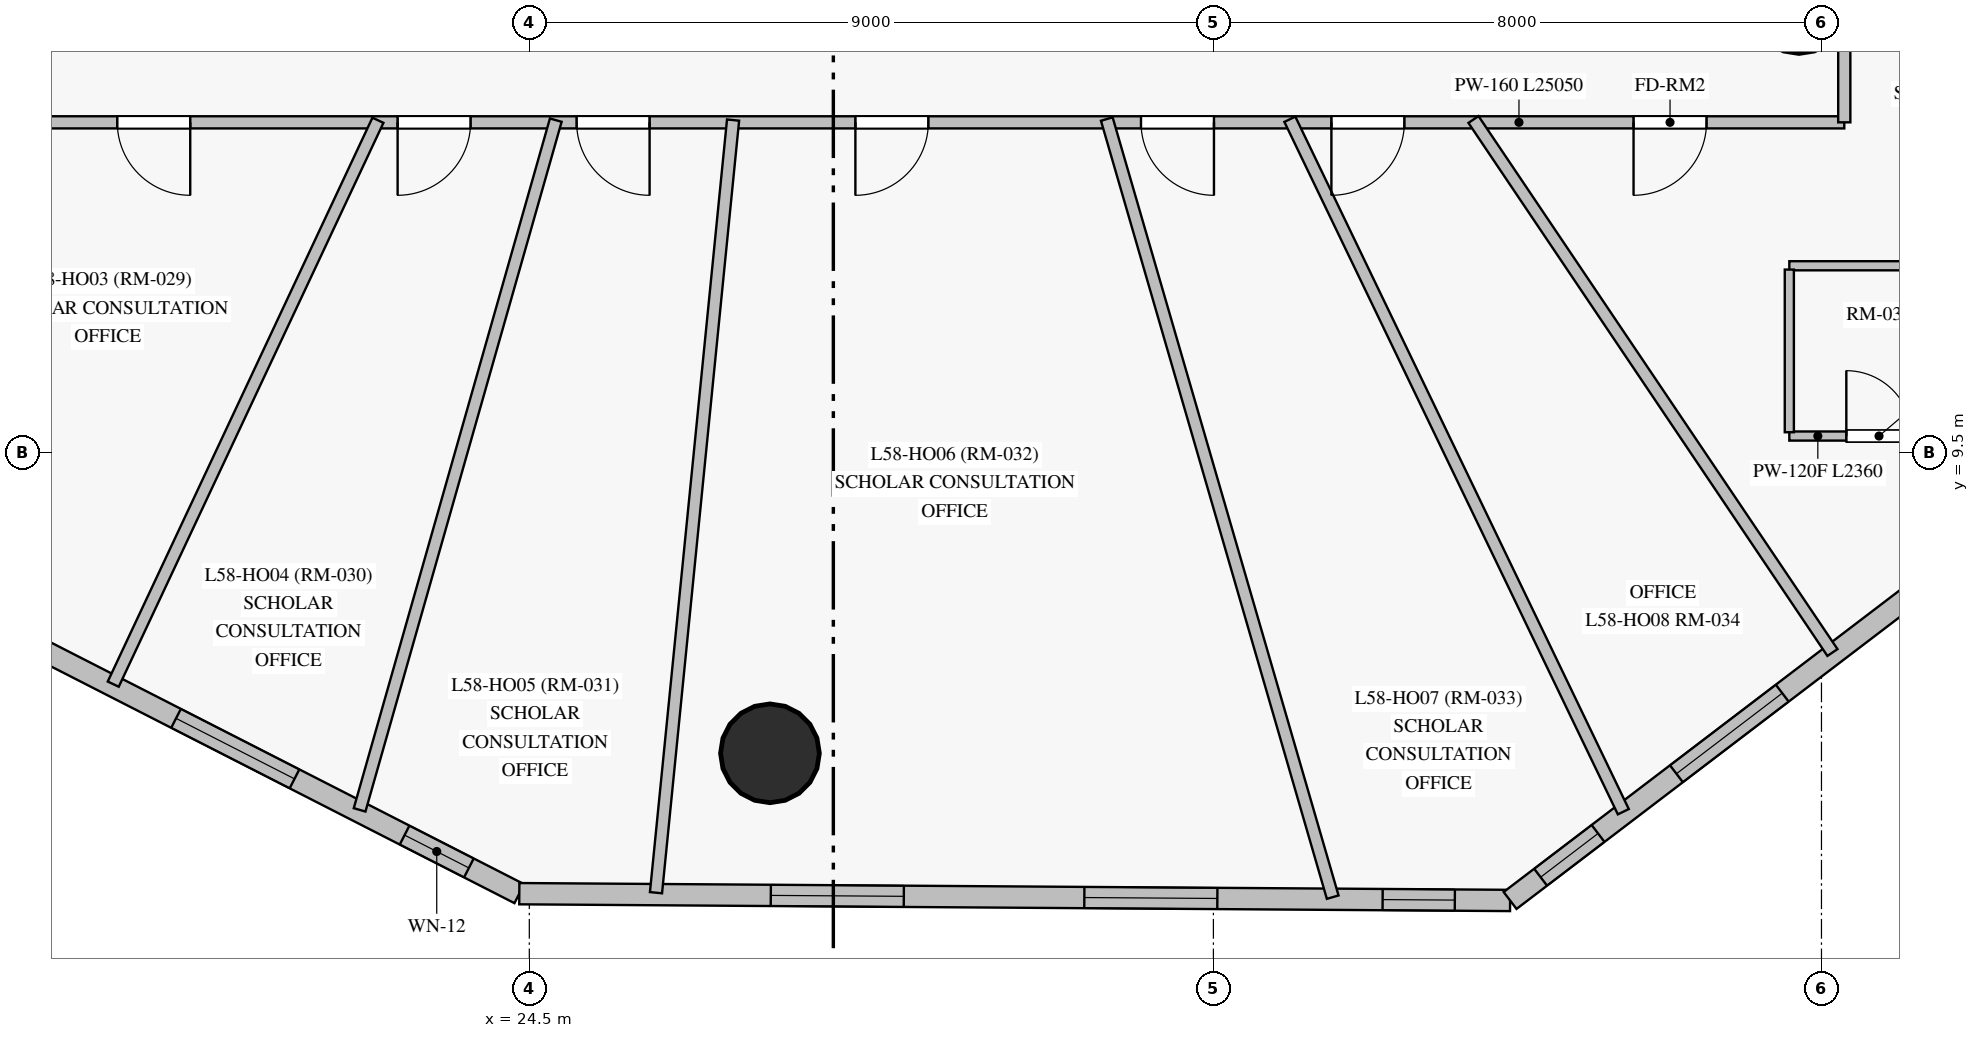
"""IFC4 building model, lengths in metres.
Left out: names, types, materials, properties, quantities, classifications, styles, units other than length and angle.
Written with IfcOpenShell. Run it as: python <this file> out.ifc"""

import sys

from ifc_helpers import new_model, si_unit, direction, frame, frame_2d, origin, origin_with_axes, origin_2d, place, context, subcontext, project, spatial, rectangle, circle, extrude, source, transform, mapped, element, fill, save


model = new_model("IFC4")
c1 = context("Model", 3, precision=1e-05, world=origin(), true_north=direction((0.0, 1.0)))
c2 = subcontext(c1, "Body", "Model", "MODEL_VIEW")
j1 = project(units=[si_unit("LENGTHUNIT", "METRE"), si_unit("PLANEANGLEUNIT", "RADIAN")], contexts=[c1])
p1 = place(None, origin())
s1 = spatial("IfcSite", under=j1, at=p1, CompositionType="ELEMENT")
p2 = place(p1, origin())
s2 = spatial("IfcBuilding", under=s1, at=p2, CompositionType="ELEMENT")
p3 = place(p2, frame((0.0, 0.0, 199.25)))
s3 = spatial("IfcBuildingStorey", under=s2, at=p3, CompositionType="ELEMENT", Elevation=199.25)
m1 = source(origin_with_axes(), c2, "Body", "SweptSolid", [
    extrude(circle(Radius=0.65, at=origin_2d()), origin(), (0.0, 0.0, 1.0), 3.05),
])
for number, where, z_axis, x_axis in (
    (1, (27.666, 5.549, 0.0), (0.0, 0.0, 1.0), (1.0, 0.0, 0.0)),
    (2, (41.204, 15.406, 0.0), (0.0, 0.0, 1.0), (1.0, 0.0, 0.0)),
):
    element("IfcColumn", number, at=place(p3, frame(where, z_axis=z_axis, x_axis=x_axis)), inside=s3, PredefinedType="COLUMN", context=c2, shape_type="MappedRepresentation", body=[
        mapped(m1, transform((0.0, 0.0, 0.0), scale=1.0)),
    ])
p4 = place(p3, frame((15.396, 8.285, 0.0), z_axis=(0.0, 0.0, 1.0), x_axis=(0.890555767274, -0.454874076394, 0.0)))
e3 = element("IfcWall", 3, at=p4, inside=s3, PredefinedType="SOLIDWALL", context=c2, shape_type="SweptSolid", body=[
    extrude(rectangle(XDim=10.075, YDim=0.28, at=frame_2d((5.037, 0.0))), origin(), (0.0, 0.0, 1.0), 2.825),
])
p5 = place(p4, frame((1.186, 0.0, 0.85)))
e4 = element("IfcOpeningElement", 4, at=p5, cuts=e3, PredefinedType="OPENING", context=c2, shape_type="SweptSolid", body=[
    extrude(rectangle(XDim=1.75, YDim=1.65, at=frame_2d((0.875, 0.825))), frame((0.0, 0.15, 0.0), z_axis=(0.0, -1.0, 0.0), x_axis=(1.0, 0.0, 0.0)), (0.0, 0.0, 1.0), 0.3),
])
p6 = place(p4, frame((5.004, 0.0, 0.85)))
e5 = element("IfcOpeningElement", 5, at=p6, cuts=e3, PredefinedType="OPENING", context=c2, shape_type="SweptSolid", body=[
    extrude(rectangle(XDim=1.75, YDim=1.65, at=frame_2d((0.875, 0.825))), frame((0.0, 0.15, 0.0), z_axis=(0.0, -1.0, 0.0), x_axis=(1.0, 0.0, 0.0)), (0.0, 0.0, 1.0), 0.3),
])
p7 = place(p4, frame((8.38, 0.0, 0.85)))
e6 = element("IfcOpeningElement", 6, at=p7, cuts=e3, PredefinedType="OPENING", context=c2, shape_type="SweptSolid", body=[
    extrude(rectangle(XDim=0.95, YDim=1.5, at=frame_2d((0.475, 0.75))), frame((0.0, 0.15, 0.0), z_axis=(0.0, -1.0, 0.0), x_axis=(1.0, 0.0, 0.0)), (0.0, 0.0, 1.0), 0.3),
])
p8 = place(p3, frame((24.368, 3.702, 0.0), z_axis=(0.0, 0.0, 1.0), x_axis=(0.999976504713, -0.006854926874, 0.0)))
e7 = element("IfcWall", 7, at=p8, inside=s3, PredefinedType="SOLIDWALL", context=c2, shape_type="SweptSolid", body=[
    extrude(rectangle(XDim=13.035, YDim=0.28, at=frame_2d((6.518, 0.0))), origin(), (0.0, 0.0, 1.0), 2.825),
])
p9 = place(p8, frame((3.309, 0.0, 0.85)))
e8 = element("IfcOpeningElement", 8, at=p9, cuts=e7, PredefinedType="OPENING", context=c2, shape_type="SweptSolid", body=[
    extrude(rectangle(XDim=1.75, YDim=1.65, at=frame_2d((0.875, 0.825))), frame((0.0, 0.15, 0.0), z_axis=(0.0, -1.0, 0.0), x_axis=(1.0, 0.0, 0.0)), (0.0, 0.0, 1.0), 0.3),
])
p10 = place(p8, frame((7.434, 0.0, 0.85)))
e9 = element("IfcOpeningElement", 9, at=p10, cuts=e7, PredefinedType="OPENING", context=c2, shape_type="SweptSolid", body=[
    extrude(rectangle(XDim=1.75, YDim=1.65, at=frame_2d((0.875, 0.825))), frame((0.0, 0.15, 0.0), z_axis=(0.0, -1.0, 0.0), x_axis=(1.0, 0.0, 0.0)), (0.0, 0.0, 1.0), 0.3),
])
p11 = place(p8, frame((11.358, 0.0, 0.85)))
e10 = element("IfcOpeningElement", 10, at=p11, cuts=e7, PredefinedType="OPENING", context=c2, shape_type="SweptSolid", body=[
    extrude(rectangle(XDim=0.95, YDim=1.5, at=frame_2d((0.475, 0.75))), frame((0.0, 0.15, 0.0), z_axis=(0.0, -1.0, 0.0), x_axis=(1.0, 0.0, 0.0)), (0.0, 0.0, 1.0), 0.3),
])
p12 = place(p3, frame((37.403, 3.613, 0.0), z_axis=(0.0, 0.0, 1.0), x_axis=(0.795510317951, 0.605940041616, 0.0)))
e11 = element("IfcWall", 11, at=p12, inside=s3, PredefinedType="SOLIDWALL", context=c2, shape_type="SweptSolid", body=[
    extrude(rectangle(XDim=10.053, YDim=0.28, at=frame_2d((5.026, 0.0))), origin(), (0.0, 0.0, 1.0), 2.825),
])
p13 = place(p12, frame((0.505, 0.0, 0.85)))
e12 = element("IfcOpeningElement", 12, at=p13, cuts=e11, PredefinedType="OPENING", context=c2, shape_type="SweptSolid", body=[
    extrude(rectangle(XDim=0.95, YDim=1.5, at=frame_2d((0.475, 0.75))), frame((0.0, 0.15, 0.0), z_axis=(0.0, -1.0, 0.0), x_axis=(1.0, 0.0, 0.0)), (0.0, 0.0, 1.0), 0.3),
])
p14 = place(p12, frame((2.751, 0.0, 0.85)))
e13 = element("IfcOpeningElement", 13, at=p14, cuts=e11, PredefinedType="OPENING", context=c2, shape_type="SweptSolid", body=[
    extrude(rectangle(XDim=1.75, YDim=1.65, at=frame_2d((0.875, 0.825))), frame((0.0, 0.15, 0.0), z_axis=(0.0, -1.0, 0.0), x_axis=(1.0, 0.0, 0.0)), (0.0, 0.0, 1.0), 0.3),
])
p15 = place(p12, frame((6.798, 0.0, 0.85)))
e14 = element("IfcOpeningElement", 14, at=p15, cuts=e11, PredefinedType="OPENING", context=c2, shape_type="SweptSolid", body=[
    extrude(rectangle(XDim=1.75, YDim=1.65, at=frame_2d((0.875, 0.825))), frame((0.0, 0.15, 0.0), z_axis=(0.0, -1.0, 0.0), x_axis=(1.0, 0.0, 0.0)), (0.0, 0.0, 1.0), 0.3),
])
p16 = place(p3, frame((41.8, 13.85, 0.0), z_axis=(0.0, 0.0, 1.0), x_axis=(-1.0, 0.0, 0.0)))
e15 = element("IfcWall", 15, at=p16, inside=s3, PredefinedType="PARTITIONING", context=c2, shape_type="SweptSolid", body=[
    extrude(rectangle(XDim=25.05, YDim=0.16, at=frame_2d((12.525, 0.0))), origin(), (0.0, 0.0, 1.0), 2.275),
])
p17 = place(p16, frame((1.812, 0.0, 0.0)))
e16 = element("IfcOpeningElement", 16, at=p17, cuts=e15, PredefinedType="OPENING", context=c2, shape_type="SweptSolid", body=[
    extrude(rectangle(XDim=0.96, YDim=2.15, at=frame_2d((0.48, 1.075))), frame((0.0, 0.09, 0.0), z_axis=(0.0, -1.0, 0.0), x_axis=(1.0, 0.0, 0.0)), (0.0, 0.0, 1.0), 0.18),
])
p18 = place(p16, frame((21.761, 0.0, 0.0)))
e17 = element("IfcOpeningElement", 17, at=p18, cuts=e15, PredefinedType="OPENING", context=c2, shape_type="SweptSolid", body=[
    extrude(rectangle(XDim=0.96, YDim=2.15, at=frame_2d((0.48, 1.075))), frame((0.0, 0.09, 0.0), z_axis=(0.0, -1.0, 0.0), x_axis=(1.0, 0.0, 0.0)), (0.0, 0.0, 1.0), 0.18),
])
p19 = place(p16, frame((18.073, 0.0, 0.0)))
e18 = element("IfcOpeningElement", 18, at=p19, cuts=e15, PredefinedType="OPENING", context=c2, shape_type="SweptSolid", body=[
    extrude(rectangle(XDim=0.96, YDim=2.15, at=frame_2d((0.48, 1.075))), frame((0.0, 0.09, 0.0), z_axis=(0.0, -1.0, 0.0), x_axis=(1.0, 0.0, 0.0)), (0.0, 0.0, 1.0), 0.18),
])
p20 = place(p16, frame((15.718, 0.0, 0.0)))
e19 = element("IfcOpeningElement", 19, at=p20, cuts=e15, PredefinedType="OPENING", context=c2, shape_type="SweptSolid", body=[
    extrude(rectangle(XDim=0.96, YDim=2.15, at=frame_2d((0.48, 1.075))), frame((0.0, 0.09, 0.0), z_axis=(0.0, -1.0, 0.0), x_axis=(1.0, 0.0, 0.0)), (0.0, 0.0, 1.0), 0.18),
])
p21 = place(p16, frame((12.05, 0.0, 0.0)))
e20 = element("IfcOpeningElement", 20, at=p21, cuts=e15, PredefinedType="OPENING", context=c2, shape_type="SweptSolid", body=[
    extrude(rectangle(XDim=0.96, YDim=2.15, at=frame_2d((0.48, 1.075))), frame((0.0, 0.09, 0.0), z_axis=(0.0, -1.0, 0.0), x_axis=(1.0, 0.0, 0.0)), (0.0, 0.0, 1.0), 0.18),
])
p22 = place(p16, frame((8.292, 0.0, 0.0)))
e21 = element("IfcOpeningElement", 21, at=p22, cuts=e15, PredefinedType="OPENING", context=c2, shape_type="SweptSolid", body=[
    extrude(rectangle(XDim=0.96, YDim=2.15, at=frame_2d((0.48, 1.075))), frame((0.0, 0.09, 0.0), z_axis=(0.0, -1.0, 0.0), x_axis=(1.0, 0.0, 0.0)), (0.0, 0.0, 1.0), 0.18),
])
p23 = place(p16, frame((5.788, 0.0, 0.0)))
e22 = element("IfcOpeningElement", 22, at=p23, cuts=e15, PredefinedType="OPENING", context=c2, shape_type="SweptSolid", body=[
    extrude(rectangle(XDim=0.96, YDim=2.15, at=frame_2d((0.48, 1.075))), frame((0.0, 0.09, 0.0), z_axis=(0.0, -1.0, 0.0), x_axis=(1.0, 0.0, 0.0)), (0.0, 0.0, 1.0), 0.18),
])
p24 = place(p3, frame((41.8, 33.45, 0.0), z_axis=(0.0, 0.0, 1.0), x_axis=(0.0, -1.0, 0.0)))
e23 = element("IfcWall", 23, at=p24, inside=s3, PredefinedType="PARTITIONING", context=c2, shape_type="SweptSolid", body=[
    extrude(rectangle(XDim=19.6, YDim=0.16, at=frame_2d((9.8, 0.0))), origin(), (0.0, 0.0, 1.0), 2.275),
])
p25 = place(p24, frame((10.475, 0.0, 0.0)))
e24 = element("IfcOpeningElement", 24, at=p25, cuts=e23, PredefinedType="OPENING", context=c2, shape_type="SweptSolid", body=[
    extrude(rectangle(XDim=0.96, YDim=2.15, at=frame_2d((0.48, 1.075))), frame((0.0, 0.09, 0.0), z_axis=(0.0, -1.0, 0.0), x_axis=(1.0, 0.0, 0.0)), (0.0, 0.0, 1.0), 0.18),
])
p26 = place(p24, frame((9.325, 0.0, 0.0)))
e25 = element("IfcOpeningElement", 25, at=p26, cuts=e23, PredefinedType="OPENING", context=c2, shape_type="SweptSolid", body=[
    extrude(rectangle(XDim=0.96, YDim=2.15, at=frame_2d((0.48, 1.075))), frame((0.0, 0.09, 0.0), z_axis=(0.0, -1.0, 0.0), x_axis=(1.0, 0.0, 0.0)), (0.0, 0.0, 1.0), 0.18),
])
p27 = place(p24, frame((4.425, 0.0, 0.0)))
e26 = element("IfcOpeningElement", 26, at=p27, cuts=e23, PredefinedType="OPENING", context=c2, shape_type="SweptSolid", body=[
    extrude(rectangle(XDim=0.96, YDim=2.15, at=frame_2d((0.48, 1.075))), frame((0.0, 0.09, 0.0), z_axis=(0.0, -1.0, 0.0), x_axis=(1.0, 0.0, 0.0)), (0.0, 0.0, 1.0), 0.18),
])
p28 = place(p3, frame((32.098, 13.893, 0.0), z_axis=(0.0, 0.0, 1.0), x_axis=(0.278805425111, -0.960347611508, 0.0)))
e27 = element("IfcWall", 27, at=p28, inside=s3, PredefinedType="PARTITIONING", context=c2, shape_type="SweptSolid", body=[
    extrude(rectangle(XDim=10.659, YDim=0.16, at=frame_2d((5.33, 0.0))), origin(), (0.0, 0.0, 1.0), 2.825),
])
p29 = place(p3, frame((27.181, 13.88, 0.0), z_axis=(0.0, 0.0, 1.0), x_axis=(-0.099281279369, -0.995059409064, 0.0)))
e28 = element("IfcWall", 28, at=p29, inside=s3, PredefinedType="PARTITIONING", context=c2, shape_type="SweptSolid", body=[
    extrude(rectangle(XDim=10.215, YDim=0.16, at=frame_2d((5.107, 0.0))), origin(), (0.0, 0.0, 1.0), 2.275),
])
p30 = place(p3, frame((34.506, 13.89, 0.0), z_axis=(0.0, 0.0, 1.0), x_axis=(0.433903461871, -0.900959369659, 0.0)))
e29 = element("IfcWall", 29, at=p30, inside=s3, PredefinedType="PARTITIONING", context=c2, shape_type="SweptSolid", body=[
    extrude(rectangle(XDim=10.111, YDim=0.16, at=frame_2d((5.056, 0.0))), origin(), (0.0, 0.0, 1.0), 2.825),
])
p31 = place(p3, frame((24.848, 13.879, 0.0), z_axis=(0.0, 0.0, 1.0), x_axis=(-0.273538310393, -0.961861108865, 0.0)))
e30 = element("IfcWall", 30, at=p31, inside=s3, PredefinedType="PARTITIONING", context=c2, shape_type="SweptSolid", body=[
    extrude(rectangle(XDim=9.434, YDim=0.16, at=frame_2d((4.717, 0.0))), origin(), (0.0, 0.0, 1.0), 2.825),
])
p32 = place(p3, frame((36.922, 13.887, 0.0), z_axis=(0.0, 0.0, 1.0), x_axis=(0.558599163164, -0.829437746255, 0.0)))
e31 = element("IfcWall", 31, at=p32, inside=s3, PredefinedType="PARTITIONING", context=c2, shape_type="SweptSolid", body=[
    extrude(rectangle(XDim=8.454, YDim=0.16, at=frame_2d((4.227, 0.0))), origin(), (0.0, 0.0, 1.0), 2.825),
])
p33 = place(p3, frame((22.509, 13.877, 0.0), z_axis=(0.0, 0.0, 1.0), x_axis=(-0.424923080235, -0.905229460349, 0.0)))
e32 = element("IfcWall", 32, at=p33, inside=s3, PredefinedType="PARTITIONING", context=c2, shape_type="SweptSolid", body=[
    extrude(rectangle(XDim=8.195, YDim=0.16, at=frame_2d((4.097, 0.0))), origin(), (0.0, 0.0, 1.0), 2.825),
])
p34 = place(p3, frame((41.077, 9.723, 0.0), z_axis=(0.0, 0.0, 1.0), x_axis=(1.0, 0.0, 0.0)))
e33 = element("IfcWall", 33, at=p34, inside=s3, PredefinedType="PARTITIONING", context=c2, shape_type="SweptSolid", body=[
    extrude(rectangle(XDim=2.36, YDim=0.12, at=frame_2d((1.18, 0.0))), origin(), (0.0, 0.0, 1.0), 2.825),
])
p35 = place(p34, frame((0.75, 0.0, 0.0)))
e34 = element("IfcOpeningElement", 34, at=p35, cuts=e33, PredefinedType="OPENING", context=c2, shape_type="SweptSolid", body=[
    extrude(rectangle(XDim=0.86, YDim=2.1, at=frame_2d((0.43, 1.05))), frame((0.0, 0.07, 0.0), z_axis=(0.0, -1.0, 0.0), x_axis=(1.0, 0.0, 0.0)), (0.0, 0.0, 1.0), 0.14),
])
p36 = place(p3, frame((43.437, 11.963, 0.0), z_axis=(0.0, 0.0, 1.0), x_axis=(-1.0, 0.0, 0.0)))
e35 = element("IfcWall", 35, at=p36, inside=s3, PredefinedType="PARTITIONING", context=c2, shape_type="SweptSolid", body=[
    extrude(rectangle(XDim=2.36, YDim=0.12, at=frame_2d((1.18, 0.0))), origin(), (0.0, 0.0, 1.0), 2.825),
])
p37 = place(p3, frame((41.077, 11.913, 0.0), z_axis=(0.0, 0.0, 1.0), x_axis=(0.0, -1.0, 0.0)))
e36 = element("IfcWall", 36, at=p37, inside=s3, PredefinedType="PARTITIONING", context=c2, shape_type="SweptSolid", body=[
    extrude(rectangle(XDim=2.14, YDim=0.12, at=frame_2d((1.07, 0.0))), origin(), (0.0, 0.0, 1.0), 2.825),
])
m2 = source(origin_with_axes(), c2, "Body", "SweptSolid", [
    extrude(rectangle(XDim=1.75, YDim=1.65, at=frame_2d((0.875, 0.825))), frame((0.0, 0.03, 0.0), z_axis=(0.0, -1.0, 0.0), x_axis=(1.0, 0.0, 0.0)), (0.0, 0.0, 1.0), 0.06),
])
p38 = place(p6, origin())
e37 = element("IfcWindow", 37, at=p38, inside=s3, PartitioningType="SINGLE_PANEL", PredefinedType="WINDOW", context=c2, shape_type="MappedRepresentation", body=[
    mapped(m2, transform((0.0, 0.0, 0.0), scale=1.0)),
])
fill(e5, e37)
m3 = source(origin_with_axes(), c2, "Body", "SweptSolid", [
    extrude(rectangle(XDim=0.95, YDim=1.5, at=frame_2d((0.475, 0.75))), frame((0.0, 0.03, 0.0), z_axis=(0.0, -1.0, 0.0), x_axis=(1.0, 0.0, 0.0)), (0.0, 0.0, 1.0), 0.06),
])
p39 = place(p7, origin())
e38 = element("IfcWindow", 38, at=p39, inside=s3, PartitioningType="SINGLE_PANEL", PredefinedType="WINDOW", context=c2, shape_type="MappedRepresentation", body=[
    mapped(m3, transform((0.0, 0.0, 0.0), scale=1.0)),
])
fill(e6, e38)
p40 = place(p9, origin())
e39 = element("IfcWindow", 39, at=p40, inside=s3, PartitioningType="SINGLE_PANEL", PredefinedType="WINDOW", context=c2, shape_type="MappedRepresentation", body=[
    mapped(m2, transform((0.0, 0.0, 0.0), scale=1.0)),
])
fill(e8, e39)
p41 = place(p10, origin())
e40 = element("IfcWindow", 40, at=p41, inside=s3, PartitioningType="SINGLE_PANEL", PredefinedType="WINDOW", context=c2, shape_type="MappedRepresentation", body=[
    mapped(m2, transform((0.0, 0.0, 0.0), scale=1.0)),
])
fill(e9, e40)
p42 = place(p11, origin())
e41 = element("IfcWindow", 41, at=p42, inside=s3, PartitioningType="SINGLE_PANEL", PredefinedType="WINDOW", context=c2, shape_type="MappedRepresentation", body=[
    mapped(m3, transform((0.0, 0.0, 0.0), scale=1.0)),
])
fill(e10, e41)
p43 = place(p13, origin())
e42 = element("IfcWindow", 42, at=p43, inside=s3, PartitioningType="SINGLE_PANEL", PredefinedType="WINDOW", context=c2, shape_type="MappedRepresentation", body=[
    mapped(m3, transform((0.0, 0.0, 0.0), scale=1.0)),
])
fill(e12, e42)
p44 = place(p14, origin())
e43 = element("IfcWindow", 43, at=p44, inside=s3, PartitioningType="SINGLE_PANEL", PredefinedType="WINDOW", context=c2, shape_type="MappedRepresentation", body=[
    mapped(m2, transform((0.0, 0.0, 0.0), scale=1.0)),
])
fill(e13, e43)
m4 = source(origin_with_axes(), c2, "Body", "SweptSolid", [
    extrude(rectangle(XDim=0.86, YDim=2.1, at=frame_2d((0.43, 1.05))), frame((0.0, 0.025, 0.0), z_axis=(0.0, -1.0, 0.0), x_axis=(1.0, 0.0, 0.0)), (0.0, 0.0, 1.0), 0.05),
])
p45 = place(p35, origin())
e44 = element("IfcDoor", 44, at=p45, inside=s3, OperationType="SINGLE_SWING_LEFT", PredefinedType="DOOR", context=c2, shape_type="MappedRepresentation", body=[
    mapped(m4, transform((0.0, 0.0, 0.0), scale=1.0)),
])
fill(e34, e44)
m5 = source(origin_with_axes(), c2, "Body", "SweptSolid", [
    extrude(rectangle(XDim=0.96, YDim=2.15, at=frame_2d((0.48, 1.075))), frame((0.0, 0.025, 0.0), z_axis=(0.0, -1.0, 0.0), x_axis=(1.0, 0.0, 0.0)), (0.0, 0.0, 1.0), 0.05),
])
p46 = place(p17, origin())
e45 = element("IfcDoor", 45, at=p46, inside=s3, OperationType="SINGLE_SWING_RIGHT", PredefinedType="DOOR", context=c2, shape_type="MappedRepresentation", body=[
    mapped(m5, transform((0.0, 0.0, 0.0), scale=1.0)),
])
fill(e16, e45)
p47 = place(p18, origin())
e46 = element("IfcDoor", 46, at=p47, inside=s3, OperationType="SINGLE_SWING_LEFT", PredefinedType="DOOR", context=c2, shape_type="MappedRepresentation", body=[
    mapped(m5, transform((0.0, 0.0, 0.0), scale=1.0)),
])
fill(e17, e46)
p48 = place(p19, origin())
e47 = element("IfcDoor", 47, at=p48, inside=s3, OperationType="SINGLE_SWING_RIGHT", PredefinedType="DOOR", context=c2, shape_type="MappedRepresentation", body=[
    mapped(m5, transform((0.0, 0.0, 0.0), scale=1.0)),
])
fill(e18, e47)
p49 = place(p20, origin())
e48 = element("IfcDoor", 48, at=p49, inside=s3, OperationType="SINGLE_SWING_LEFT", PredefinedType="DOOR", context=c2, shape_type="MappedRepresentation", body=[
    mapped(m5, transform((0.0, 0.0, 0.0), scale=1.0)),
])
fill(e19, e48)
p50 = place(p21, origin())
e49 = element("IfcDoor", 49, at=p50, inside=s3, OperationType="SINGLE_SWING_RIGHT", PredefinedType="DOOR", context=c2, shape_type="MappedRepresentation", body=[
    mapped(m5, transform((0.0, 0.0, 0.0), scale=1.0)),
])
fill(e20, e49)
p51 = place(p22, origin())
e50 = element("IfcDoor", 50, at=p51, inside=s3, OperationType="SINGLE_SWING_LEFT", PredefinedType="DOOR", context=c2, shape_type="MappedRepresentation", body=[
    mapped(m5, transform((0.0, 0.0, 0.0), scale=1.0)),
])
fill(e21, e50)
p52 = place(p23, origin())
e51 = element("IfcDoor", 51, at=p52, inside=s3, OperationType="SINGLE_SWING_RIGHT", PredefinedType="DOOR", context=c2, shape_type="MappedRepresentation", body=[
    mapped(m5, transform((0.0, 0.0, 0.0), scale=1.0)),
])
fill(e22, e51)
save(model, sys.argv[1])
